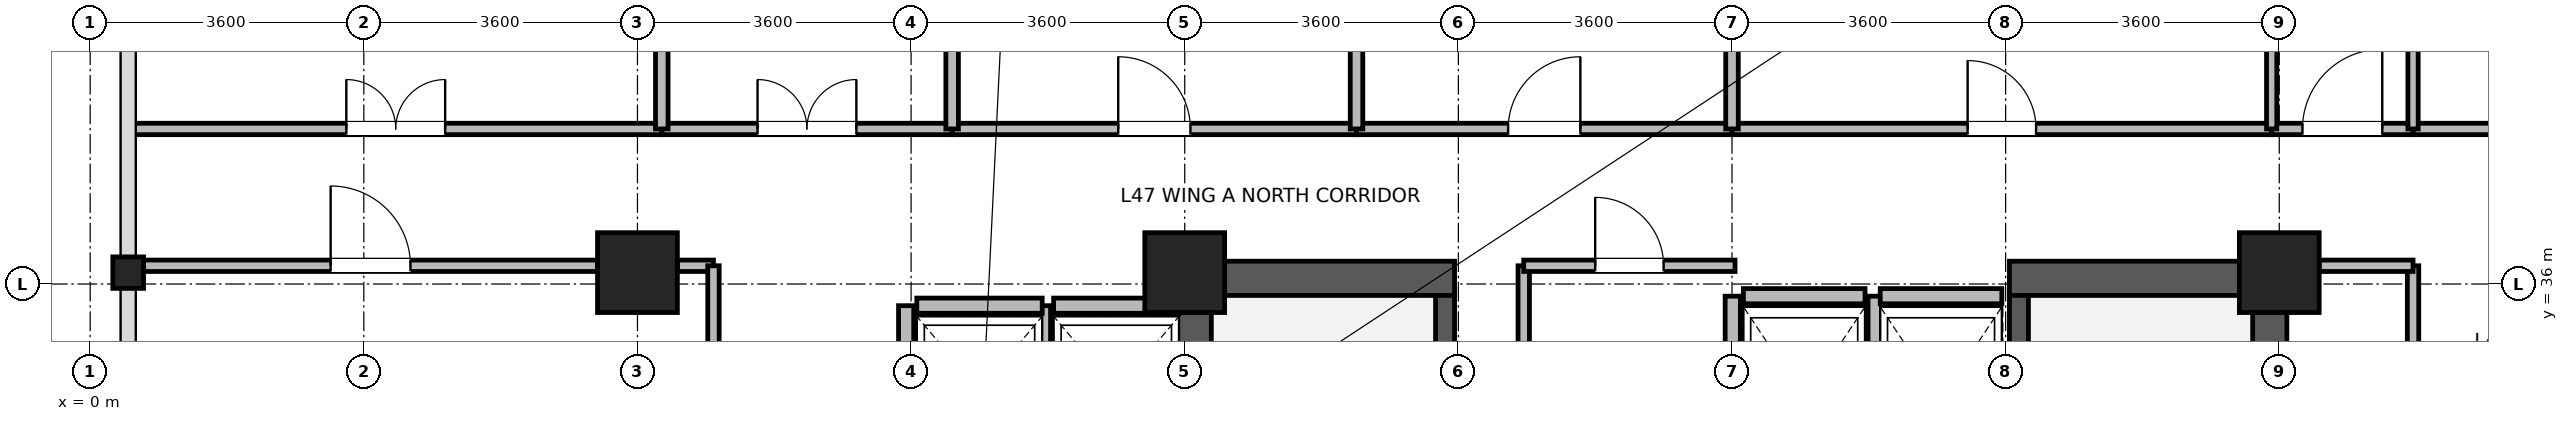
"""IFC4 building model, lengths in metres.
Left out: names, types, materials, properties, quantities, classifications, styles, units other than length and angle.
Written with IfcOpenShell. Run it as: python <this file> out.ifc"""

import sys

from ifc_helpers import new_model, si_unit, direction, frame, frame_2d, origin, origin_2d, place, context, subcontext, project, spatial, rectangle, i_section, extrude, source, transform, mapped, element, fill, save


model = new_model("IFC4")
c1 = context("Model", 3, precision=1e-05, world=origin(), true_north=direction((0.0, 1.0)))
c2 = subcontext(c1, "Body", "Model", "MODEL_VIEW")
j1 = project(units=[si_unit("LENGTHUNIT", "METRE"), si_unit("PLANEANGLEUNIT", "RADIAN")], contexts=[c1])
p1 = place(None, origin())
s1 = spatial("IfcSite", under=j1, at=p1, CompositionType="ELEMENT")
p2 = place(p1, origin())
s2 = spatial("IfcBuilding", under=s1, at=p2, CompositionType="ELEMENT")
p3 = place(p2, frame((0.0, 0.0, 184.6)))
s3 = spatial("IfcBuildingStorey", under=s2, at=p3, CompositionType="ELEMENT", Elevation=184.6)
for number, where, z_axis, x_axis in (
    (1, (14.525, 28.4, 0.0), (0.0, 0.0, 1.0), (0.0, 1.0, 0.0)),
    (2, (28.675, 28.4, 0.0), (0.0, 0.0, 1.0), (0.0, 1.0, 0.0)),
):
    element("IfcWall", number, at=place(p3, frame(where, z_axis=z_axis, x_axis=x_axis)), inside=s3, PredefinedType="SHEAR", context=c2, shape_type="SweptSolid", body=[
        extrude(rectangle(XDim=7.9, YDim=0.45, at=frame_2d((3.95, 0.0))), origin(), (0.0, 0.0, 1.0), 3.46),
    ])
for number, where, z_axis, x_axis in (
    (3, (14.75, 36.075, 0.0), (0.0, 0.0, 1.0), (1.0, 0.0, 0.0)),
    (4, (25.25, 36.075, 0.0), (0.0, 0.0, 1.0), (1.0, 0.0, 0.0)),
):
    element("IfcWall", number, at=place(p3, frame(where, z_axis=z_axis, x_axis=x_axis)), inside=s3, PredefinedType="SHEAR", context=c2, shape_type="SweptSolid", body=[
        extrude(rectangle(XDim=3.2, YDim=0.45, at=frame_2d((1.6, 0.0))), origin(), (0.0, 0.0, 1.0), 3.46),
    ])
p4 = place(p3, frame((17.825, 28.85, 0.0), z_axis=(0.0, 0.0, 1.0), x_axis=(0.0, 1.0, 0.0)))
e5 = element("IfcWall", 5, at=p4, inside=s3, PredefinedType="SHEAR", context=c2, shape_type="SweptSolid", body=[
    extrude(rectangle(XDim=7.0, YDim=0.25, at=frame_2d((3.5, 0.0))), origin(), (0.0, 0.0, 1.0), 3.46),
])
p5 = place(p4, frame((0.15, 0.0, 0.0)))
e6 = element("IfcOpeningElement", 6, at=p5, cuts=e5, PredefinedType="OPENING", context=c2, shape_type="SweptSolid", body=[
    extrude(rectangle(XDim=1.1, YDim=2.08, at=frame_2d((0.55, 1.04))), frame((0.0, 0.135, 0.0), z_axis=(0.0, -1.0, 0.0), x_axis=(1.0, 0.0, 0.0)), (0.0, 0.0, 1.0), 0.27),
])
p6 = place(p3, frame((25.375, 28.85, 0.0), z_axis=(0.0, 0.0, 1.0), x_axis=(0.0, 1.0, 0.0)))
e7 = element("IfcWall", 7, at=p6, inside=s3, PredefinedType="SHEAR", context=c2, shape_type="SweptSolid", body=[
    extrude(rectangle(XDim=7.0, YDim=0.25, at=frame_2d((3.5, 0.0))), origin(), (0.0, 0.0, 1.0), 3.46),
])
p7 = place(p6, frame((0.15, 0.0, 0.0)))
e8 = element("IfcOpeningElement", 8, at=p7, cuts=e7, PredefinedType="OPENING", context=c2, shape_type="SweptSolid", body=[
    extrude(rectangle(XDim=1.1, YDim=2.08, at=frame_2d((0.55, 1.04))), frame((0.0, 0.135, 0.0), z_axis=(0.0, -1.0, 0.0), x_axis=(1.0, 0.0, 0.0)), (0.0, 0.0, 1.0), 0.27),
])
m1 = source(origin(), c2, "Body", "SweptSolid", [
    extrude(rectangle(XDim=1.05, YDim=1.05, at=origin_2d()), origin(), (0.0, 0.0, 1.0), 3.7),
])
for number, where, z_axis, x_axis in (
    (9, (7.2, 36.15, 0.0), (0.0, 0.0, 1.0), (1.0, 0.0, 0.0)),
    (10, (14.4, 36.15, 0.0), (0.0, 0.0, 1.0), (1.0, 0.0, 0.0)),
    (11, (28.8, 36.15, 0.0), (0.0, 0.0, 1.0), (1.0, 0.0, 0.0)),
):
    element("IfcColumn", number, at=place(p3, frame(where, z_axis=z_axis, x_axis=x_axis)), inside=s3, PredefinedType="COLUMN", context=c2, shape_type="MappedRepresentation", body=[
        mapped(m1, transform((0.0, 0.0, 0.0), x_axis=(1.0, 0.0, 0.0), y_axis=(0.0, 1.0, 0.0), z_axis=(0.0, 0.0, 1.0), scale=1.0)),
    ])
m2 = source(origin(), c2, "Body", "SweptSolid", [
    extrude(i_section(OverallWidth=0.404, OverallDepth=0.414, WebThickness=0.021, FlangeThickness=0.028, FilletRadius=0.015, at=origin_2d()), origin(), (0.0, 0.0, 1.0), 3.7),
])
p8 = place(p3, frame((0.5, 36.15, 0.0), z_axis=(0.0, 0.0, 1.0), x_axis=(1.0, 0.0, 0.0)))
e12 = element("IfcColumn", 12, at=p8, inside=s3, PredefinedType="COLUMN", context=c2, shape_type="MappedRepresentation", body=[
    mapped(m2, transform((0.0, 0.0, 0.0), x_axis=(1.0, 0.0, 0.0), y_axis=(0.0, 1.0, 0.0), z_axis=(0.0, 0.0, 1.0), scale=1.0)),
])
p9 = place(p3, frame((12.675, 35.715, 0.0), z_axis=(0.0, 0.0, 1.0), x_axis=(1.0, 0.0, 0.0)))
e13 = element("IfcWall", 13, at=p9, inside=s3, PredefinedType="PARTITIONING", context=c2, shape_type="SweptSolid", body=[
    extrude(rectangle(XDim=1.65, YDim=0.2, at=frame_2d((0.825, 0.0))), origin(), (0.0, 0.0, 1.0), 3.44),
])
p10 = place(p3, frame((12.535, 33.485, 0.0), z_axis=(0.0, 0.0, 1.0), x_axis=(0.0, 1.0, 0.0)))
e14 = element("IfcWall", 14, at=p10, inside=s3, PredefinedType="PARTITIONING", context=c2, shape_type="SweptSolid", body=[
    extrude(rectangle(XDim=2.23, YDim=0.2, at=frame_2d((1.115, 0.0))), origin(), (0.0, 0.0, 1.0), 3.44),
])
p11 = place(p3, frame((10.875, 35.715, 0.0), z_axis=(0.0, 0.0, 1.0), x_axis=(1.0, 0.0, 0.0)))
e15 = element("IfcWall", 15, at=p11, inside=s3, PredefinedType="PARTITIONING", context=c2, shape_type="SweptSolid", body=[
    extrude(rectangle(XDim=1.65, YDim=0.2, at=frame_2d((0.825, 0.0))), origin(), (0.0, 0.0, 1.0), 3.44),
])
p12 = place(p3, frame((10.735, 33.485, 0.0), z_axis=(0.0, 0.0, 1.0), x_axis=(0.0, 1.0, 0.0)))
e16 = element("IfcWall", 16, at=p12, inside=s3, PredefinedType="PARTITIONING", context=c2, shape_type="SweptSolid", body=[
    extrude(rectangle(XDim=2.23, YDim=0.2, at=frame_2d((1.115, 0.0))), origin(), (0.0, 0.0, 1.0), 3.44),
])
p13 = place(p3, frame((21.75, 35.84, 0.0), z_axis=(0.0, 0.0, 1.0), x_axis=(1.0, 0.0, 0.0)))
e17 = element("IfcWall", 17, at=p13, inside=s3, PredefinedType="PARTITIONING", context=c2, shape_type="SweptSolid", body=[
    extrude(rectangle(XDim=1.6, YDim=0.2, at=frame_2d((0.8, 0.0))), origin(), (0.0, 0.0, 1.0), 2.44),
])
for number, where, z_axis, x_axis in (
    (18, (21.61, 33.16, 0.0), (0.0, 0.0, 1.0), (0.0, 1.0, 0.0)),
    (19, (23.49, 33.16, 0.0), (0.0, 0.0, 1.0), (0.0, 1.0, 0.0)),
):
    element("IfcWall", number, at=place(p3, frame(where, z_axis=z_axis, x_axis=x_axis)), inside=s3, PredefinedType="PARTITIONING", context=c2, shape_type="SweptSolid", body=[
        extrude(rectangle(XDim=2.68, YDim=0.2, at=frame_2d((1.34, 0.0))), origin(), (0.0, 0.0, 1.0), 3.44),
    ])
p14 = place(p3, frame((23.55, 35.84, 0.0), z_axis=(0.0, 0.0, 1.0), x_axis=(1.0, 0.0, 0.0)))
e20 = element("IfcWall", 20, at=p14, inside=s3, PredefinedType="PARTITIONING", context=c2, shape_type="SweptSolid", body=[
    extrude(rectangle(XDim=1.6, YDim=0.2, at=frame_2d((0.8, 0.0))), origin(), (0.0, 0.0, 1.0), 2.44),
])
p15 = place(p3, frame((0.702, 36.24, 0.0), z_axis=(0.0, 0.0, 1.0), x_axis=(1.0, 0.0, 0.0)))
e21 = element("IfcWall", 21, at=p15, inside=s3, PredefinedType="PARTITIONING", context=c2, shape_type="SweptSolid", body=[
    extrude(rectangle(XDim=5.973, YDim=0.15, at=frame_2d((2.987, 0.0))), origin(), (0.0, 0.0, 1.0), 2.84),
])
p16 = place(p15, frame((2.461, 0.0, 0.0)))
e22 = element("IfcOpeningElement", 22, at=p16, cuts=e21, PredefinedType="OPENING", context=c2, shape_type="SweptSolid", body=[
    extrude(rectangle(XDim=1.05, YDim=2.12, at=frame_2d((0.525, 1.06))), frame((0.0, 0.085, 0.0), z_axis=(0.0, -1.0, 0.0), x_axis=(1.0, 0.0, 0.0)), (0.0, 0.0, 1.0), 0.17),
])
p17 = place(p3, frame((7.725, 36.24, 0.0), z_axis=(0.0, 0.0, 1.0), x_axis=(1.0, 0.0, 0.0)))
e23 = element("IfcWall", 23, at=p17, inside=s3, PredefinedType="PARTITIONING", context=c2, shape_type="SweptSolid", body=[
    extrude(rectangle(XDim=0.475, YDim=0.15, at=frame_2d((0.237, 0.0))), origin(), (0.0, 0.0, 1.0), 2.84),
])
p18 = place(p3, frame((21.6, 38.04, 0.0), z_axis=(0.0, 0.0, 1.0), x_axis=(1.0, 0.0, 0.0)))
e24 = element("IfcWall", 24, at=p18, inside=s3, PredefinedType="PARTITIONING", context=c2, shape_type="SweptSolid", body=[
    extrude(rectangle(XDim=7.1, YDim=0.15, at=frame_2d((3.55, 0.0))), origin(), (0.0, 0.0, 1.0), 3.44),
])
p19 = place(p18, frame((3.1, 0.0, 0.0)))
e25 = element("IfcOpeningElement", 25, at=p19, cuts=e24, PredefinedType="OPENING", context=c2, shape_type="SweptSolid", body=[
    extrude(rectangle(XDim=0.9, YDim=2.08, at=frame_2d((0.45, 1.04))), frame((0.0, 0.085, 0.0), z_axis=(0.0, -1.0, 0.0), x_axis=(1.0, 0.0, 0.0)), (0.0, 0.0, 1.0), 0.17),
])
p20 = place(p3, frame((0.52, 38.04, 0.0), z_axis=(0.0, 0.0, 1.0), x_axis=(1.0, 0.0, 0.0)))
e26 = element("IfcWall", 26, at=p20, inside=s3, PredefinedType="PARTITIONING", context=c2, shape_type="SweptSolid", body=[
    extrude(rectangle(XDim=7.0, YDim=0.15, at=frame_2d((3.5, 0.0))), origin(), (0.0, 0.0, 1.0), 3.44),
])
p21 = place(p20, frame((2.85, 0.0, 0.0)))
e27 = element("IfcOpeningElement", 27, at=p21, cuts=e26, PredefinedType="OPENING", context=c2, shape_type="SweptSolid", body=[
    extrude(rectangle(XDim=1.3, YDim=2.12, at=frame_2d((0.65, 1.06))), frame((0.0, 0.085, 0.0), z_axis=(0.0, -1.0, 0.0), x_axis=(1.0, 0.0, 0.0)), (0.0, 0.0, 1.0), 0.17),
])
p22 = place(p3, frame((11.34, 38.04, 0.0), z_axis=(0.0, 0.0, 1.0), x_axis=(1.0, 0.0, 0.0)))
e28 = element("IfcWall", 28, at=p22, inside=s3, PredefinedType="PARTITIONING", context=c2, shape_type="SweptSolid", body=[
    extrude(rectangle(XDim=5.32, YDim=0.15, at=frame_2d((2.66, 0.0))), origin(), (0.0, 0.0, 1.0), 3.44),
])
p23 = place(p22, frame((2.185, 0.0, 0.0)))
e29 = element("IfcOpeningElement", 29, at=p23, cuts=e28, PredefinedType="OPENING", context=c2, shape_type="SweptSolid", body=[
    extrude(rectangle(XDim=0.95, YDim=2.1, at=frame_2d((0.475, 1.05))), frame((0.0, 0.085, 0.0), z_axis=(0.0, -1.0, 0.0), x_axis=(1.0, 0.0, 0.0)), (0.0, 0.0, 1.0), 0.17),
])
p24 = place(p3, frame((16.66, 38.04, 0.0), z_axis=(0.0, 0.0, 1.0), x_axis=(1.0, 0.0, 0.0)))
e30 = element("IfcWall", 30, at=p24, inside=s3, PredefinedType="PARTITIONING", context=c2, shape_type="SweptSolid", body=[
    extrude(rectangle(XDim=4.94, YDim=0.15, at=frame_2d((2.47, 0.0))), origin(), (0.0, 0.0, 1.0), 3.44),
])
p25 = place(p24, frame((1.995, 0.0, 0.0)))
e31 = element("IfcOpeningElement", 31, at=p25, cuts=e30, PredefinedType="OPENING", context=c2, shape_type="SweptSolid", body=[
    extrude(rectangle(XDim=0.95, YDim=2.1, at=frame_2d((0.475, 1.05))), frame((0.0, 0.085, 0.0), z_axis=(0.0, -1.0, 0.0), x_axis=(1.0, 0.0, 0.0)), (0.0, 0.0, 1.0), 0.17),
])
p26 = place(p3, frame((30.56, 38.04, 0.0), z_axis=(0.0, 0.0, 1.0), x_axis=(1.0, 0.0, 0.0)))
e32 = element("IfcWall", 32, at=p26, inside=s3, PredefinedType="PARTITIONING", context=c2, shape_type="SweptSolid", body=[
    extrude(rectangle(XDim=4.8, YDim=0.15, at=frame_2d((2.4, 0.0))), origin(), (0.0, 0.0, 1.0), 3.44),
])
p27 = place(p26, frame((1.75, 0.0, 0.0)))
e33 = element("IfcOpeningElement", 33, at=p27, cuts=e32, PredefinedType="OPENING", context=c2, shape_type="SweptSolid", body=[
    extrude(rectangle(XDim=1.3, YDim=2.12, at=frame_2d((0.65, 1.06))), frame((0.0, 0.085, 0.0), z_axis=(0.0, -1.0, 0.0), x_axis=(1.0, 0.0, 0.0)), (0.0, 0.0, 1.0), 0.17),
])
p28 = place(p3, frame((30.56, 31.64, 0.0), z_axis=(0.0, 0.0, 1.0), x_axis=(0.0, 1.0, 0.0)))
e34 = element("IfcWall", 34, at=p28, inside=s3, PredefinedType="PARTITIONING", context=c2, shape_type="SweptSolid", body=[
    extrude(rectangle(XDim=4.6, YDim=0.15, at=frame_2d((2.3, 0.0))), origin(), (0.0, 0.0, 1.0), 3.44),
])
p29 = place(p28, frame((1.65, 0.0, 0.0)))
e35 = element("IfcOpeningElement", 35, at=p29, cuts=e34, PredefinedType="OPENING", context=c2, shape_type="SweptSolid", body=[
    extrude(rectangle(XDim=1.3, YDim=2.12, at=frame_2d((0.65, 1.06))), frame((0.0, 0.085, 0.0), z_axis=(0.0, -1.0, 0.0), x_axis=(1.0, 0.0, 0.0)), (0.0, 0.0, 1.0), 0.17),
])
p30 = place(p3, frame((8.2, 32.4, 0.0), z_axis=(0.0, 0.0, 1.0), x_axis=(0.0, 1.0, 0.0)))
e36 = element("IfcWall", 36, at=p30, inside=s3, PredefinedType="PARTITIONING", context=c2, shape_type="SweptSolid", body=[
    extrude(rectangle(XDim=3.84, YDim=0.15, at=frame_2d((1.92, 0.0))), origin(), (0.0, 0.0, 1.0), 3.44),
])
p31 = place(p3, frame((7.52, 38.04, 0.0), z_axis=(0.0, 0.0, 1.0), x_axis=(1.0, 0.0, 0.0)))
e37 = element("IfcWall", 37, at=p31, inside=s3, PredefinedType="PARTITIONING", context=c2, shape_type="SweptSolid", body=[
    extrude(rectangle(XDim=3.82, YDim=0.15, at=frame_2d((1.91, 0.0))), origin(), (0.0, 0.0, 1.0), 3.44),
])
p32 = place(p31, frame((1.26, 0.0, 0.0)))
e38 = element("IfcOpeningElement", 38, at=p32, cuts=e37, PredefinedType="OPENING", context=c2, shape_type="SweptSolid", body=[
    extrude(rectangle(XDim=1.3, YDim=2.12, at=frame_2d((0.65, 1.06))), frame((0.0, 0.085, 0.0), z_axis=(0.0, -1.0, 0.0), x_axis=(1.0, 0.0, 0.0)), (0.0, 0.0, 1.0), 0.17),
])
p33 = place(p3, frame((18.86, 33.36, 0.0), z_axis=(0.0, 0.0, 1.0), x_axis=(0.0, 1.0, 0.0)))
e39 = element("IfcWall", 39, at=p33, inside=s3, PredefinedType="PARTITIONING", context=c2, shape_type="SweptSolid", body=[
    extrude(rectangle(XDim=2.88, YDim=0.15, at=frame_2d((1.44, 0.0))), origin(), (0.0, 0.0, 1.0), 3.44),
])
p34 = place(p3, frame((18.86, 36.24, 0.0), z_axis=(0.0, 0.0, 1.0), x_axis=(1.0, 0.0, 0.0)))
e40 = element("IfcWall", 40, at=p34, inside=s3, PredefinedType="PARTITIONING", context=c2, shape_type="SweptSolid", body=[
    extrude(rectangle(XDim=2.78, YDim=0.15, at=frame_2d((1.39, 0.0))), origin(), (0.0, 0.0, 1.0), 2.44),
])
p35 = place(p34, frame((0.94, 0.0, 0.0)))
e41 = element("IfcOpeningElement", 41, at=p35, cuts=e40, PredefinedType="OPENING", context=c2, shape_type="SweptSolid", body=[
    extrude(rectangle(XDim=0.9, YDim=2.08, at=frame_2d((0.45, 1.04))), frame((0.0, 0.085, 0.0), z_axis=(0.0, -1.0, 0.0), x_axis=(1.0, 0.0, 0.0)), (0.0, 0.0, 1.0), 0.17),
])
p36 = place(p3, frame((28.7, 38.04, 0.0), z_axis=(0.0, 0.0, 1.0), x_axis=(1.0, 0.0, 0.0)))
e42 = element("IfcWall", 42, at=p36, inside=s3, PredefinedType="PARTITIONING", context=c2, shape_type="SweptSolid", body=[
    extrude(rectangle(XDim=1.86, YDim=0.15, at=frame_2d((0.93, 0.0))), origin(), (0.0, 0.0, 1.0), 3.44),
])
p37 = place(p36, frame((0.405, 0.0, 0.0)))
e43 = element("IfcOpeningElement", 43, at=p37, cuts=e42, PredefinedType="OPENING", context=c2, shape_type="SweptSolid", body=[
    extrude(rectangle(XDim=1.05, YDim=2.12, at=frame_2d((0.525, 1.06))), frame((0.0, 0.085, 0.0), z_axis=(0.0, -1.0, 0.0), x_axis=(1.0, 0.0, 0.0)), (0.0, 0.0, 1.0), 0.17),
])
p38 = place(p3, frame((29.325, 36.24, 0.0), z_axis=(0.0, 0.0, 1.0), x_axis=(1.0, 0.0, 0.0)))
e44 = element("IfcWall", 44, at=p38, inside=s3, PredefinedType="PARTITIONING", context=c2, shape_type="SweptSolid", body=[
    extrude(rectangle(XDim=1.235, YDim=0.15, at=frame_2d((0.618, 0.0))), origin(), (0.0, 0.0, 1.0), 2.84),
])
for number, where, z_axis, x_axis in (
    (45, (7.52, 38.04, 0.0), (0.0, 0.0, 1.0), (0.0, 1.0, 0.0)),
    (46, (16.66, 38.04, 0.0), (0.0, 0.0, 1.0), (0.0, 1.0, 0.0)),
):
    element("IfcWall", number, at=place(p3, frame(where, z_axis=z_axis, x_axis=x_axis)), inside=s3, PredefinedType="PARTITIONING", context=c2, shape_type="SweptSolid", body=[
        extrude(rectangle(XDim=5.028, YDim=0.165, at=frame_2d((2.514, 0.0))), origin(), (0.0, 0.0, 1.0), 3.44),
    ])
p39 = place(p3, frame((21.6, 38.04, 0.0), z_axis=(0.0, 0.0, 1.0), x_axis=(0.0, 1.0, 0.0)))
e47 = element("IfcWall", 47, at=p39, inside=s3, PredefinedType="PARTITIONING", context=c2, shape_type="SweptSolid", body=[
    extrude(rectangle(XDim=5.028, YDim=0.165, at=frame_2d((2.514, 0.0))), origin(), (0.0, 0.0, 1.0), 2.99),
])
p40 = place(p3, frame((28.7, 38.04, 0.0), z_axis=(0.0, 0.0, 1.0), x_axis=(0.0, 1.0, 0.0)))
e48 = element("IfcWall", 48, at=p40, inside=s3, PredefinedType="PARTITIONING", context=c2, shape_type="SweptSolid", body=[
    extrude(rectangle(XDim=5.028, YDim=0.135, at=frame_2d((2.514, 0.0))), origin(), (0.0, 0.0, 1.0), 2.99),
])
p41 = place(p3, frame((30.56, 38.04, 0.0), z_axis=(0.0, 0.0, 1.0), x_axis=(0.0, 1.0, 0.0)))
e49 = element("IfcWall", 49, at=p41, inside=s3, PredefinedType="PARTITIONING", context=c2, shape_type="SweptSolid", body=[
    extrude(rectangle(XDim=5.028, YDim=0.135, at=frame_2d((2.514, 0.0))), origin(), (0.0, 0.0, 1.0), 3.44),
])
p42 = place(p3, frame((11.34, 38.04, 0.0), z_axis=(0.0, 0.0, 1.0), x_axis=(0.0, 1.0, 0.0)))
e50 = element("IfcWall", 50, at=p42, inside=s3, PredefinedType="PARTITIONING", context=c2, shape_type="SweptSolid", body=[
    extrude(rectangle(XDim=3.26, YDim=0.165, at=frame_2d((1.63, 0.0))), origin(), (0.0, 0.0, 1.0), 3.44),
])
p43 = place(p16, origin())
e51 = element("IfcDoor", 51, at=p43, inside=s3, OperationType="SINGLE_SWING_LEFT", PredefinedType="DOOR", context=c2, shape_type="SweptSolid", body=[
    extrude(rectangle(XDim=1.05, YDim=2.12, at=frame_2d((0.525, 1.06))), frame((0.0, 0.025, 0.0), z_axis=(0.0, -1.0, 0.0), x_axis=(1.0, 0.0, 0.0)), (0.0, 0.0, 1.0), 0.05),
])
fill(e22, e51)
p44 = place(p19, origin())
e52 = element("IfcDoor", 52, at=p44, inside=s3, OperationType="SINGLE_SWING_LEFT", PredefinedType="DOOR", context=c2, shape_type="SweptSolid", body=[
    extrude(rectangle(XDim=0.9, YDim=2.08, at=frame_2d((0.45, 1.04))), frame((0.0, 0.025, 0.0), z_axis=(0.0, -1.0, 0.0), x_axis=(1.0, 0.0, 0.0)), (0.0, 0.0, 1.0), 0.05),
])
fill(e25, e52)
p45 = place(p21, origin())
e53 = element("IfcDoor", 53, at=p45, inside=s3, OperationType="DOUBLE_DOOR_SINGLE_SWING", PredefinedType="DOOR", context=c2, shape_type="SweptSolid", body=[
    extrude(rectangle(XDim=1.3, YDim=2.12, at=frame_2d((0.65, 1.06))), frame((0.0, 0.025, 0.0), z_axis=(0.0, -1.0, 0.0), x_axis=(1.0, 0.0, 0.0)), (0.0, 0.0, 1.0), 0.05),
])
fill(e27, e53)
p46 = place(p23, origin())
e54 = element("IfcDoor", 54, at=p46, inside=s3, OperationType="SINGLE_SWING_LEFT", PredefinedType="DOOR", context=c2, shape_type="SweptSolid", body=[
    extrude(rectangle(XDim=0.95, YDim=2.1, at=frame_2d((0.475, 1.05))), frame((0.0, 0.025, 0.0), z_axis=(0.0, -1.0, 0.0), x_axis=(1.0, 0.0, 0.0)), (0.0, 0.0, 1.0), 0.05),
])
fill(e29, e54)
p47 = place(p25, origin())
e55 = element("IfcDoor", 55, at=p47, inside=s3, OperationType="SINGLE_SWING_RIGHT", PredefinedType="DOOR", context=c2, shape_type="SweptSolid", body=[
    extrude(rectangle(XDim=0.95, YDim=2.1, at=frame_2d((0.475, 1.05))), frame((0.0, 0.025, 0.0), z_axis=(0.0, -1.0, 0.0), x_axis=(1.0, 0.0, 0.0)), (0.0, 0.0, 1.0), 0.05),
])
fill(e31, e55)
p48 = place(p32, origin())
e56 = element("IfcDoor", 56, at=p48, inside=s3, OperationType="DOUBLE_DOOR_SINGLE_SWING", PredefinedType="DOOR", context=c2, shape_type="SweptSolid", body=[
    extrude(rectangle(XDim=1.3, YDim=2.12, at=frame_2d((0.65, 1.06))), frame((0.0, 0.025, 0.0), z_axis=(0.0, -1.0, 0.0), x_axis=(1.0, 0.0, 0.0)), (0.0, 0.0, 1.0), 0.05),
])
fill(e38, e56)
p49 = place(p35, origin())
e57 = element("IfcDoor", 57, at=p49, inside=s3, OperationType="SINGLE_SWING_LEFT", PredefinedType="DOOR", context=c2, shape_type="SweptSolid", body=[
    extrude(rectangle(XDim=0.9, YDim=2.08, at=frame_2d((0.45, 1.04))), frame((0.0, 0.025, 0.0), z_axis=(0.0, -1.0, 0.0), x_axis=(1.0, 0.0, 0.0)), (0.0, 0.0, 1.0), 0.05),
])
fill(e41, e57)
p50 = place(p37, origin())
e58 = element("IfcDoor", 58, at=p50, inside=s3, OperationType="SINGLE_SWING_RIGHT", PredefinedType="DOOR", context=c2, shape_type="SweptSolid", body=[
    extrude(rectangle(XDim=1.05, YDim=2.12, at=frame_2d((0.525, 1.06))), frame((0.0, 0.025, 0.0), z_axis=(0.0, -1.0, 0.0), x_axis=(1.0, 0.0, 0.0)), (0.0, 0.0, 1.0), 0.05),
])
fill(e43, e58)
save(model, sys.argv[1])
